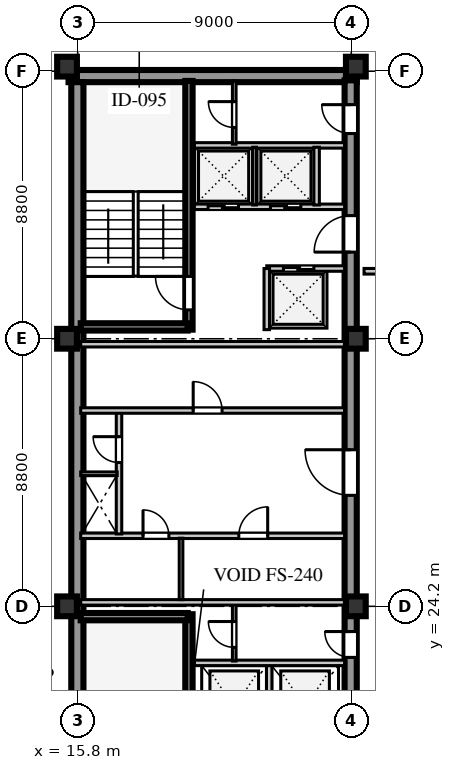
"""IFC4 building model, lengths in metres.
Left out: names, types, materials, properties, quantities, classifications, styles, units other than length and angle.
Written with IfcOpenShell. Run it as: python <this file> out.ifc"""

import sys

from ifc_helpers import new_model, si_unit, direction, frame, frame_2d, origin, origin_2d, place, context, subcontext, project, spatial, rectangle, extrude, element, fill, save


model = new_model("IFC4")
c1 = context("Model", 3, precision=1e-05, world=origin(), true_north=direction((0.0, 1.0)))
c2 = subcontext(c1, "Body", "Model", "MODEL_VIEW")
j1 = project(units=[si_unit("LENGTHUNIT", "METRE"), si_unit("PLANEANGLEUNIT", "RADIAN")], contexts=[c1])
p1 = place(None, origin())
s1 = spatial("IfcSite", under=j1, at=p1, CompositionType="ELEMENT")
p2 = place(p1, origin())
s2 = spatial("IfcBuilding", under=s1, at=p2, CompositionType="ELEMENT")
p3 = place(p2, frame((0.0, 0.0, 335.3)))
s3 = spatial("IfcBuildingStorey", under=s2, at=p3, CompositionType="ELEMENT", Elevation=335.3)
p4 = place(p3, frame((15.5, 41.64, 0.0), z_axis=(0.0, 0.0, 1.0), x_axis=(1.0, 0.0, 0.0)))
e1 = element("IfcWall", 1, at=p4, inside=s3, PredefinedType="SHEAR", context=c2, shape_type="SweptSolid", body=[
    extrude(rectangle(XDim=9.48, YDim=0.4, at=frame_2d((4.74, 0.0))), origin(), (0.0, 0.0, 1.0), 3.56),
])
p5 = place(p3, frame((15.79, 15.81, 0.0), z_axis=(0.0, 0.0, 1.0), x_axis=(0.0, 1.0, 0.0)))
e2 = element("IfcWall", 2, at=p5, inside=s3, PredefinedType="SHEAR", context=c2, shape_type="SweptSolid", body=[
    extrude(rectangle(XDim=25.63, YDim=0.4, at=frame_2d((12.815, 0.0))), origin(), (0.0, 0.0, 1.0), 3.56),
])
p6 = place(p3, frame((24.78, 15.74, 0.0), z_axis=(0.0, 0.0, 1.0), x_axis=(0.0, 1.0, 0.0)))
e3 = element("IfcWall", 3, at=p6, inside=s3, PredefinedType="SHEAR", context=c2, shape_type="SweptSolid", body=[
    extrude(rectangle(XDim=25.76, YDim=0.4, at=frame_2d((12.88, 0.0))), origin(), (0.0, 0.0, 1.0), 3.56),
])
p7 = place(p6, frame((1.61, 0.0, 0.0)))
e4 = element("IfcOpeningElement", 4, at=p7, cuts=e3, PredefinedType="OPENING", context=c2, shape_type="SweptSolid", body=[
    extrude(rectangle(XDim=1.2, YDim=2.1, at=frame_2d((0.6, 1.05))), frame((0.0, 0.21, 0.0), z_axis=(0.0, -1.0, 0.0), x_axis=(1.0, 0.0, 0.0)), (0.0, 0.0, 1.0), 0.42),
])
p8 = place(p6, frame((6.78, 0.0, 0.0)))
e5 = element("IfcOpeningElement", 5, at=p8, cuts=e3, PredefinedType="OPENING", context=c2, shape_type="SweptSolid", body=[
    extrude(rectangle(XDim=0.85, YDim=2.06, at=frame_2d((0.425, 1.03))), frame((0.0, 0.21, 0.0), z_axis=(0.0, -1.0, 0.0), x_axis=(1.0, 0.0, 0.0)), (0.0, 0.0, 1.0), 0.42),
])
p9 = place(p6, frame((12.11, 0.0, 0.0)))
e6 = element("IfcOpeningElement", 6, at=p9, cuts=e3, PredefinedType="OPENING", context=c2, shape_type="SweptSolid", body=[
    extrude(rectangle(XDim=1.5, YDim=2.12, at=frame_2d((0.75, 1.06))), frame((0.0, 0.21, 0.0), z_axis=(0.0, -1.0, 0.0), x_axis=(1.0, 0.0, 0.0)), (0.0, 0.0, 1.0), 0.42),
])
p10 = place(p6, frame((20.11, 0.0, 0.0)))
e7 = element("IfcOpeningElement", 7, at=p10, cuts=e3, PredefinedType="OPENING", context=c2, shape_type="SweptSolid", body=[
    extrude(rectangle(XDim=1.2, YDim=2.12, at=frame_2d((0.6, 1.06))), frame((0.0, 0.21, 0.0), z_axis=(0.0, -1.0, 0.0), x_axis=(1.0, 0.0, 0.0)), (0.0, 0.0, 1.0), 0.42),
])
p11 = place(p6, frame((24.01, 0.0, 0.0)))
e8 = element("IfcOpeningElement", 8, at=p11, cuts=e3, PredefinedType="OPENING", context=c2, shape_type="SweptSolid", body=[
    extrude(rectangle(XDim=0.95, YDim=2.1, at=frame_2d((0.475, 1.05))), frame((0.0, 0.21, 0.0), z_axis=(0.0, -1.0, 0.0), x_axis=(1.0, 0.0, 0.0)), (0.0, 0.0, 1.0), 0.42),
])
for number, where, z_axis, x_axis in (
    (9, (15.45, 24.2, 0.0), (0.0, 0.0, 1.0), (1.0, 0.0, 0.0)),
    (10, (15.45, 33.0, 0.0), (0.0, 0.0, 1.0), (1.0, 0.0, 0.0)),
    (11, (15.45, 41.95, 0.0), (0.0, 0.0, 1.0), (1.0, 0.0, 0.0)),
    (12, (24.95, 24.2, 0.0), (0.0, 0.0, 1.0), (1.0, 0.0, 0.0)),
    (13, (24.95, 33.0, 0.0), (0.0, 0.0, 1.0), (1.0, 0.0, 0.0)),
    (14, (24.95, 41.95, 0.0), (0.0, 0.0, 1.0), (1.0, 0.0, 0.0)),
):
    element("IfcColumn", number, at=place(p3, frame(where, z_axis=z_axis, x_axis=x_axis)), inside=s3, PredefinedType="COLUMN", context=c2, shape_type="SweptSolid", body=[
        extrude(rectangle(XDim=0.65, YDim=0.65, at=origin_2d()), origin(), (0.0, 0.0, 1.0), 3.56),
    ])
p12 = place(p3, frame((19.46, 15.74, 0.0), z_axis=(0.0, 0.0, 1.0), x_axis=(0.0, 1.0, 0.0)))
e15 = element("IfcWall", 15, at=p12, inside=s3, PredefinedType="SHEAR", context=c2, shape_type="SweptSolid", body=[
    extrude(rectangle(XDim=8.2, YDim=0.24, at=frame_2d((4.1, 0.0))), origin(), (0.0, 0.0, 1.0), 3.8),
])
p13 = place(p12, frame((0.45, 0.0, 0.0)))
e16 = element("IfcOpeningElement", 16, at=p13, cuts=e15, PredefinedType="OPENING", context=c2, shape_type="SweptSolid", body=[
    extrude(rectangle(XDim=1.1, YDim=2.1, at=frame_2d((0.55, 1.05))), frame((0.0, 0.13, 0.0), z_axis=(0.0, -1.0, 0.0), x_axis=(1.0, 0.0, 0.0)), (0.0, 0.0, 1.0), 0.26),
])
p14 = place(p3, frame((15.9, 23.86, 0.0), z_axis=(0.0, 0.0, 1.0), x_axis=(1.0, 0.0, 0.0)))
e17 = element("IfcWall", 17, at=p14, inside=s3, PredefinedType="SHEAR", context=c2, shape_type="SweptSolid", body=[
    extrude(rectangle(XDim=3.52, YDim=0.24, at=frame_2d((1.76, 0.0))), origin(), (0.0, 0.0, 1.0), 3.8),
])
p15 = place(p3, frame((22.1, 19.51, 0.0), z_axis=(0.0, 0.0, 1.0), x_axis=(0.0, 1.0, 0.0)))
e18 = element("IfcWall", 18, at=p15, inside=s3, PredefinedType="SOLIDWALL", context=c2, shape_type="SweptSolid", body=[
    extrude(rectangle(XDim=2.74, YDim=0.18, at=frame_2d((1.37, 0.0))), origin(), (0.0, 0.0, 1.0), 3.56),
])
p16 = place(p3, frame((19.64, 22.34, 0.0), z_axis=(0.0, 0.0, 1.0), x_axis=(1.0, 0.0, 0.0)))
e19 = element("IfcWall", 19, at=p16, inside=s3, PredefinedType="SOLIDWALL", context=c2, shape_type="SweptSolid", body=[
    extrude(rectangle(XDim=4.94, YDim=0.18, at=frame_2d((2.47, 0.0))), origin(), (0.0, 0.0, 1.0), 3.56),
])
p17 = place(p3, frame((20.95, 22.4, 0.0), z_axis=(0.0, 0.0, 1.0), x_axis=(0.0, 1.0, 0.0)))
e20 = element("IfcWall", 20, at=p17, inside=s3, PredefinedType="PARTITIONING", context=c2, shape_type="SweptSolid", body=[
    extrude(rectangle(XDim=1.88, YDim=0.12, at=frame_2d((0.94, 0.0))), origin(), (0.0, 0.0, 1.0), 3.56),
])
p18 = place(p17, frame((0.45, 0.0, 0.0)))
e21 = element("IfcOpeningElement", 21, at=p18, cuts=e20, PredefinedType="OPENING", context=c2, shape_type="SweptSolid", body=[
    extrude(rectangle(XDim=0.85, YDim=2.06, at=frame_2d((0.425, 1.03))), frame((0.0, 0.07, 0.0), z_axis=(0.0, -1.0, 0.0), x_axis=(1.0, 0.0, 0.0)), (0.0, 0.0, 1.0), 0.14),
])
p19 = place(p3, frame((15.9, 26.52, 0.0), z_axis=(0.0, 0.0, 1.0), x_axis=(1.0, 0.0, 0.0)))
e22 = element("IfcWall", 22, at=p19, inside=s3, PredefinedType="SOLIDWALL", context=c2, shape_type="SweptSolid", body=[
    extrude(rectangle(XDim=8.68, YDim=0.18, at=frame_2d((4.34, 0.0))), origin(), (0.0, 0.0, 1.0), 3.56),
])
p20 = place(p19, frame((2.05, 0.0, 0.0)))
e23 = element("IfcOpeningElement", 23, at=p20, cuts=e22, PredefinedType="OPENING", context=c2, shape_type="SweptSolid", body=[
    extrude(rectangle(XDim=0.85, YDim=2.06, at=frame_2d((0.425, 1.03))), frame((0.0, 0.1, 0.0), z_axis=(0.0, -1.0, 0.0), x_axis=(1.0, 0.0, 0.0)), (0.0, 0.0, 1.0), 0.2),
])
p21 = place(p19, frame((5.2, 0.0, 0.0)))
e24 = element("IfcOpeningElement", 24, at=p21, cuts=e22, PredefinedType="OPENING", context=c2, shape_type="SweptSolid", body=[
    extrude(rectangle(XDim=0.95, YDim=2.1, at=frame_2d((0.475, 1.05))), frame((0.0, 0.1, 0.0), z_axis=(0.0, -1.0, 0.0), x_axis=(1.0, 0.0, 0.0)), (0.0, 0.0, 1.0), 0.2),
])
p22 = place(p3, frame((15.9, 24.33, 0.0), z_axis=(0.0, 0.0, 1.0), x_axis=(1.0, 0.0, 0.0)))
e25 = element("IfcWall", 25, at=p22, inside=s3, PredefinedType="SOLIDWALL", context=c2, shape_type="SweptSolid", body=[
    extrude(rectangle(XDim=8.68, YDim=0.18, at=frame_2d((4.34, 0.0))), origin(), (0.0, 0.0, 1.0), 2.96),
])
p23 = place(p3, frame((19.2, 24.42, 0.0), z_axis=(0.0, 0.0, 1.0), x_axis=(0.0, 1.0, 0.0)))
e26 = element("IfcWall", 26, at=p23, inside=s3, PredefinedType="PARTITIONING", context=c2, shape_type="SweptSolid", body=[
    extrude(rectangle(XDim=2.02, YDim=0.12, at=frame_2d((1.01, 0.0))), origin(), (0.0, 0.0, 1.0), 3.56),
])
p24 = place(p3, frame((17.16, 26.58, 0.0), z_axis=(0.0, 0.0, 1.0), x_axis=(0.0, 1.0, 0.0)))
e27 = element("IfcWall", 27, at=p24, inside=s3, PredefinedType="SOLIDWALL", context=c2, shape_type="SweptSolid", body=[
    extrude(rectangle(XDim=4.02, YDim=0.18, at=frame_2d((2.01, 0.0))), origin(), (0.0, 0.0, 1.0), 3.56),
])
p25 = place(p24, frame((2.35, 0.0, 0.0)))
e28 = element("IfcOpeningElement", 28, at=p25, cuts=e27, PredefinedType="OPENING", context=c2, shape_type="SweptSolid", body=[
    extrude(rectangle(XDim=0.85, YDim=2.06, at=frame_2d((0.425, 1.03))), frame((0.0, 0.1, 0.0), z_axis=(0.0, -1.0, 0.0), x_axis=(1.0, 0.0, 0.0)), (0.0, 0.0, 1.0), 0.2),
])
p26 = place(p3, frame((15.9, 28.56, 0.0), z_axis=(0.0, 0.0, 1.0), x_axis=(1.0, 0.0, 0.0)))
e29 = element("IfcWall", 29, at=p26, inside=s3, PredefinedType="PARTITIONING", context=c2, shape_type="SweptSolid", body=[
    extrude(rectangle(XDim=1.2, YDim=0.12, at=frame_2d((0.6, 0.0))), origin(), (0.0, 0.0, 1.0), 3.56),
])
p27 = place(p3, frame((15.9, 30.64, 0.0), z_axis=(0.0, 0.0, 1.0), x_axis=(1.0, 0.0, 0.0)))
e30 = element("IfcWall", 30, at=p27, inside=s3, PredefinedType="SOLIDWALL", context=c2, shape_type="SweptSolid", body=[
    extrude(rectangle(XDim=8.68, YDim=0.18, at=frame_2d((4.34, 0.0))), origin(), (0.0, 0.0, 1.0), 3.56),
])
p28 = place(p27, frame((3.7, 0.0, 0.0)))
e31 = element("IfcOpeningElement", 31, at=p28, cuts=e30, PredefinedType="OPENING", context=c2, shape_type="SweptSolid", body=[
    extrude(rectangle(XDim=0.95, YDim=2.1, at=frame_2d((0.475, 1.05))), frame((0.0, 0.1, 0.0), z_axis=(0.0, -1.0, 0.0), x_axis=(1.0, 0.0, 0.0)), (0.0, 0.0, 1.0), 0.2),
])
p29 = place(p3, frame((15.9, 32.82, 0.0), z_axis=(0.0, 0.0, 1.0), x_axis=(1.0, 0.0, 0.0)))
e32 = element("IfcWall", 32, at=p29, inside=s3, PredefinedType="SOLIDWALL", context=c2, shape_type="SweptSolid", body=[
    extrude(rectangle(XDim=8.68, YDim=0.18, at=frame_2d((4.34, 0.0))), origin(), (0.0, 0.0, 1.0), 2.96),
])
p30 = place(p3, frame((19.46, 33.3, 0.0), z_axis=(0.0, 0.0, 1.0), x_axis=(0.0, 1.0, 0.0)))
e33 = element("IfcWall", 33, at=p30, inside=s3, PredefinedType="SHEAR", context=c2, shape_type="SweptSolid", body=[
    extrude(rectangle(XDim=8.18, YDim=0.24, at=frame_2d((4.09, 0.0))), origin(), (0.0, 0.0, 1.0), 3.8),
])
p31 = place(p30, frame((0.65, 0.0, 0.0)))
e34 = element("IfcOpeningElement", 34, at=p31, cuts=e33, PredefinedType="OPENING", context=c2, shape_type="SweptSolid", body=[
    extrude(rectangle(XDim=1.1, YDim=2.1, at=frame_2d((0.55, 1.05))), frame((0.0, 0.13, 0.0), z_axis=(0.0, -1.0, 0.0), x_axis=(1.0, 0.0, 0.0)), (0.0, 0.0, 1.0), 0.26),
])
p32 = place(p3, frame((15.9, 33.39, 0.0), z_axis=(0.0, 0.0, 1.0), x_axis=(1.0, 0.0, 0.0)))
e35 = element("IfcWall", 35, at=p32, inside=s3, PredefinedType="SHEAR", context=c2, shape_type="SweptSolid", body=[
    extrude(rectangle(XDim=3.52, YDim=0.24, at=frame_2d((1.76, 0.0))), origin(), (0.0, 0.0, 1.0), 3.8),
])
p33 = place(p3, frame((22.02, 35.31, 0.0), z_axis=(0.0, 0.0, 1.0), x_axis=(1.0, 0.0, 0.0)))
e36 = element("IfcWall", 36, at=p33, inside=s3, PredefinedType="SOLIDWALL", context=c2, shape_type="SweptSolid", body=[
    extrude(rectangle(XDim=2.56, YDim=0.18, at=frame_2d((1.28, 0.0))), origin(), (0.0, 0.0, 1.0), 3.56),
])
p34 = place(p33, frame((0.55, 0.0, 0.0)))
e37 = element("IfcOpeningElement", 37, at=p34, cuts=e36, PredefinedType="OPENING", context=c2, shape_type="SweptSolid", body=[
    extrude(rectangle(XDim=1.0, YDim=2.1, at=frame_2d((0.5, 1.05))), frame((0.0, 0.1, 0.0), z_axis=(0.0, -1.0, 0.0), x_axis=(1.0, 0.0, 0.0)), (0.0, 0.0, 1.0), 0.2),
])
p35 = place(p3, frame((22.02, 33.3, 0.0), z_axis=(0.0, 0.0, 1.0), x_axis=(0.0, 1.0, 0.0)))
e38 = element("IfcWall", 38, at=p35, inside=s3, PredefinedType="SOLIDWALL", context=c2, shape_type="SweptSolid", body=[
    extrude(rectangle(XDim=2.01, YDim=0.18, at=frame_2d((1.005, 0.0))), origin(), (0.0, 0.0, 1.0), 3.56),
])
p36 = place(p3, frame((19.64, 37.34, 0.0), z_axis=(0.0, 0.0, 1.0), x_axis=(1.0, 0.0, 0.0)))
e39 = element("IfcWall", 39, at=p36, inside=s3, PredefinedType="SOLIDWALL", context=c2, shape_type="SweptSolid", body=[
    extrude(rectangle(XDim=4.94, YDim=0.18, at=frame_2d((2.47, 0.0))), origin(), (0.0, 0.0, 1.0), 3.56),
])
p37 = place(p36, frame((0.45, 0.0, 0.0)))
e40 = element("IfcOpeningElement", 40, at=p37, cuts=e39, PredefinedType="OPENING", context=c2, shape_type="SweptSolid", body=[
    extrude(rectangle(XDim=1.0, YDim=2.1, at=frame_2d((0.5, 1.05))), frame((0.0, 0.1, 0.0), z_axis=(0.0, -1.0, 0.0), x_axis=(1.0, 0.0, 0.0)), (0.0, 0.0, 1.0), 0.2),
])
p38 = place(p36, frame((2.5, 0.0, 0.0)))
e41 = element("IfcOpeningElement", 41, at=p38, cuts=e39, PredefinedType="OPENING", context=c2, shape_type="SweptSolid", body=[
    extrude(rectangle(XDim=1.0, YDim=2.1, at=frame_2d((0.5, 1.05))), frame((0.0, 0.1, 0.0), z_axis=(0.0, -1.0, 0.0), x_axis=(1.0, 0.0, 0.0)), (0.0, 0.0, 1.0), 0.2),
])
p39 = place(p3, frame((19.64, 39.36, 0.0), z_axis=(0.0, 0.0, 1.0), x_axis=(1.0, 0.0, 0.0)))
e42 = element("IfcWall", 42, at=p39, inside=s3, PredefinedType="SOLIDWALL", context=c2, shape_type="SweptSolid", body=[
    extrude(rectangle(XDim=4.94, YDim=0.18, at=frame_2d((2.47, 0.0))), origin(), (0.0, 0.0, 1.0), 3.56),
])
p40 = place(p3, frame((21.62, 37.4, 0.0), z_axis=(0.0, 0.0, 1.0), x_axis=(0.0, 1.0, 0.0)))
e43 = element("IfcWall", 43, at=p40, inside=s3, PredefinedType="PARTITIONING", context=c2, shape_type="SweptSolid", body=[
    extrude(rectangle(XDim=1.9, YDim=0.12, at=frame_2d((0.95, 0.0))), origin(), (0.0, 0.0, 1.0), 3.56),
])
p41 = place(p3, frame((23.66, 37.4, 0.0), z_axis=(0.0, 0.0, 1.0), x_axis=(0.0, 1.0, 0.0)))
e44 = element("IfcWall", 44, at=p41, inside=s3, PredefinedType="SOLIDWALL", context=c2, shape_type="SweptSolid", body=[
    extrude(rectangle(XDim=1.9, YDim=0.18, at=frame_2d((0.95, 0.0))), origin(), (0.0, 0.0, 1.0), 3.56),
])
p42 = place(p3, frame((20.95, 39.4, 0.0), z_axis=(0.0, 0.0, 1.0), x_axis=(0.0, 1.0, 0.0)))
e45 = element("IfcWall", 45, at=p42, inside=s3, PredefinedType="PARTITIONING", context=c2, shape_type="SweptSolid", body=[
    extrude(rectangle(XDim=2.08, YDim=0.12, at=frame_2d((1.04, 0.0))), origin(), (0.0, 0.0, 1.0), 3.56),
])
p43 = place(p42, frame((0.55, 0.0, 0.0)))
e46 = element("IfcOpeningElement", 46, at=p43, cuts=e45, PredefinedType="OPENING", context=c2, shape_type="SweptSolid", body=[
    extrude(rectangle(XDim=0.85, YDim=2.06, at=frame_2d((0.425, 1.03))), frame((0.0, 0.07, 0.0), z_axis=(0.0, -1.0, 0.0), x_axis=(1.0, 0.0, 0.0)), (0.0, 0.0, 1.0), 0.14),
])
p44 = place(p3, frame((25.22, 35.22, 0.0), z_axis=(0.0, 0.0, 1.0), x_axis=(1.0, 0.0, 0.0)))
e47 = element("IfcWall", 47, at=p44, inside=s3, PredefinedType="SOLIDWALL", context=c2, shape_type="SweptSolid", body=[
    extrude(rectangle(XDim=9.5, YDim=0.185, at=frame_2d((4.75, 0.0))), origin(), (0.0, 0.0, 1.0), 3.56),
])
p45 = place(p44, frame((3.2, 0.0, 0.0)))
e48 = element("IfcOpeningElement", 48, at=p45, cuts=e47, PredefinedType="OPENING", context=c2, shape_type="SweptSolid", body=[
    extrude(rectangle(XDim=1.0, YDim=2.08, at=frame_2d((0.5, 1.04))), frame((0.0, 0.103, 0.0), z_axis=(0.0, -1.0, 0.0), x_axis=(1.0, 0.0, 0.0)), (0.0, 0.0, 1.0), 0.205),
])
p46 = place(p44, frame((6.2, 0.0, 0.0)))
e49 = element("IfcOpeningElement", 49, at=p46, cuts=e47, PredefinedType="OPENING", context=c2, shape_type="SweptSolid", body=[
    extrude(rectangle(XDim=0.9, YDim=2.08, at=frame_2d((0.45, 1.04))), frame((0.0, 0.103, 0.0), z_axis=(0.0, -1.0, 0.0), x_axis=(1.0, 0.0, 0.0)), (0.0, 0.0, 1.0), 0.205),
])
p47 = place(p18, origin())
e50 = element("IfcDoor", 50, at=p47, inside=s3, OperationType="SINGLE_SWING_RIGHT", PredefinedType="DOOR", context=c2, shape_type="SweptSolid", body=[
    extrude(rectangle(XDim=0.85, YDim=2.06, at=frame_2d((0.425, 1.03))), frame((0.0, 0.025, 0.0), z_axis=(0.0, -1.0, 0.0), x_axis=(1.0, 0.0, 0.0)), (0.0, 0.0, 1.0), 0.05),
])
fill(e21, e50)
p48 = place(p8, frame((0.85, 0.0, 0.0), z_axis=(0.0, 0.0, 1.0), x_axis=(-1.0, 0.0, 0.0)))
e51 = element("IfcDoor", 51, at=p48, inside=s3, OperationType="SINGLE_SWING_LEFT", PredefinedType="DOOR", context=c2, shape_type="SweptSolid", body=[
    extrude(rectangle(XDim=0.85, YDim=2.06, at=frame_2d((0.425, 1.03))), frame((0.0, 0.025, 0.0), z_axis=(0.0, -1.0, 0.0), x_axis=(1.0, 0.0, 0.0)), (0.0, 0.0, 1.0), 0.05),
])
fill(e5, e51)
p49 = place(p20, origin())
e52 = element("IfcDoor", 52, at=p49, inside=s3, OperationType="SINGLE_SWING_LEFT", PredefinedType="DOOR", context=c2, shape_type="SweptSolid", body=[
    extrude(rectangle(XDim=0.85, YDim=2.06, at=frame_2d((0.425, 1.03))), frame((0.0, 0.025, 0.0), z_axis=(0.0, -1.0, 0.0), x_axis=(1.0, 0.0, 0.0)), (0.0, 0.0, 1.0), 0.05),
])
fill(e23, e52)
p50 = place(p21, origin())
e53 = element("IfcDoor", 53, at=p50, inside=s3, OperationType="SINGLE_SWING_RIGHT", PredefinedType="DOOR", context=c2, shape_type="SweptSolid", body=[
    extrude(rectangle(XDim=0.95, YDim=2.1, at=frame_2d((0.475, 1.05))), frame((0.0, 0.025, 0.0), z_axis=(0.0, -1.0, 0.0), x_axis=(1.0, 0.0, 0.0)), (0.0, 0.0, 1.0), 0.05),
])
fill(e24, e53)
p51 = place(p25, origin())
e54 = element("IfcDoor", 54, at=p51, inside=s3, OperationType="SINGLE_SWING_RIGHT", PredefinedType="DOOR", context=c2, shape_type="SweptSolid", body=[
    extrude(rectangle(XDim=0.85, YDim=2.06, at=frame_2d((0.425, 1.03))), frame((0.0, 0.025, 0.0), z_axis=(0.0, -1.0, 0.0), x_axis=(1.0, 0.0, 0.0)), (0.0, 0.0, 1.0), 0.05),
])
fill(e28, e54)
p52 = place(p9, frame((1.5, 0.0, 0.0), z_axis=(0.0, 0.0, 1.0), x_axis=(-1.0, 0.0, 0.0)))
e55 = element("IfcDoor", 55, at=p52, inside=s3, OperationType="SINGLE_SWING_LEFT", PredefinedType="DOOR", context=c2, shape_type="SweptSolid", body=[
    extrude(rectangle(XDim=1.5, YDim=2.12, at=frame_2d((0.75, 1.06))), frame((0.0, 0.025, 0.0), z_axis=(0.0, -1.0, 0.0), x_axis=(1.0, 0.0, 0.0)), (0.0, 0.0, 1.0), 0.05),
])
fill(e6, e55)
p53 = place(p28, frame((0.95, 0.0, 0.0), z_axis=(0.0, 0.0, 1.0), x_axis=(-1.0, 0.0, 0.0)))
e56 = element("IfcDoor", 56, at=p53, inside=s3, OperationType="SINGLE_SWING_RIGHT", PredefinedType="DOOR", context=c2, shape_type="SweptSolid", body=[
    extrude(rectangle(XDim=0.95, YDim=2.1, at=frame_2d((0.475, 1.05))), frame((0.0, 0.025, 0.0), z_axis=(0.0, -1.0, 0.0), x_axis=(1.0, 0.0, 0.0)), (0.0, 0.0, 1.0), 0.05),
])
fill(e31, e56)
p54 = place(p31, origin())
e57 = element("IfcDoor", 57, at=p54, inside=s3, OperationType="SINGLE_SWING_RIGHT", PredefinedType="DOOR", context=c2, shape_type="SweptSolid", body=[
    extrude(rectangle(XDim=1.1, YDim=2.1, at=frame_2d((0.55, 1.05))), frame((0.0, 0.025, 0.0), z_axis=(0.0, -1.0, 0.0), x_axis=(1.0, 0.0, 0.0)), (0.0, 0.0, 1.0), 0.05),
])
fill(e34, e57)
p55 = place(p10, frame((1.2, 0.0, 0.0), z_axis=(0.0, 0.0, 1.0), x_axis=(-1.0, 0.0, 0.0)))
e58 = element("IfcDoor", 58, at=p55, inside=s3, OperationType="SINGLE_SWING_RIGHT", PredefinedType="DOOR", context=c2, shape_type="SweptSolid", body=[
    extrude(rectangle(XDim=1.2, YDim=2.12, at=frame_2d((0.6, 1.06))), frame((0.0, 0.025, 0.0), z_axis=(0.0, -1.0, 0.0), x_axis=(1.0, 0.0, 0.0)), (0.0, 0.0, 1.0), 0.05),
])
fill(e7, e58)
p56 = place(p37, frame((1.0, 0.0, 0.0), z_axis=(0.0, 0.0, 1.0), x_axis=(-1.0, 0.0, 0.0)))
e59 = element("IfcDoor", 59, at=p56, inside=s3, OperationType="DOUBLE_DOOR_SLIDING", PredefinedType="DOOR", context=c2, shape_type="SweptSolid", body=[
    extrude(rectangle(XDim=1.0, YDim=2.1, at=frame_2d((0.5, 1.05))), frame((0.0, 0.025, 0.0), z_axis=(0.0, -1.0, 0.0), x_axis=(1.0, 0.0, 0.0)), (0.0, 0.0, 1.0), 0.05),
])
fill(e40, e59)
p57 = place(p38, frame((1.0, 0.0, 0.0), z_axis=(0.0, 0.0, 1.0), x_axis=(-1.0, 0.0, 0.0)))
e60 = element("IfcDoor", 60, at=p57, inside=s3, OperationType="DOUBLE_DOOR_SLIDING", PredefinedType="DOOR", context=c2, shape_type="SweptSolid", body=[
    extrude(rectangle(XDim=1.0, YDim=2.1, at=frame_2d((0.5, 1.05))), frame((0.0, 0.025, 0.0), z_axis=(0.0, -1.0, 0.0), x_axis=(1.0, 0.0, 0.0)), (0.0, 0.0, 1.0), 0.05),
])
fill(e41, e60)
p58 = place(p34, origin())
e61 = element("IfcDoor", 61, at=p58, inside=s3, OperationType="DOUBLE_DOOR_SLIDING", PredefinedType="DOOR", context=c2, shape_type="SweptSolid", body=[
    extrude(rectangle(XDim=1.0, YDim=2.1, at=frame_2d((0.5, 1.05))), frame((0.0, 0.025, 0.0), z_axis=(0.0, -1.0, 0.0), x_axis=(1.0, 0.0, 0.0)), (0.0, 0.0, 1.0), 0.05),
])
fill(e37, e61)
p59 = place(p43, origin())
e62 = element("IfcDoor", 62, at=p59, inside=s3, OperationType="SINGLE_SWING_RIGHT", PredefinedType="DOOR", context=c2, shape_type="SweptSolid", body=[
    extrude(rectangle(XDim=0.85, YDim=2.06, at=frame_2d((0.425, 1.03))), frame((0.0, 0.025, 0.0), z_axis=(0.0, -1.0, 0.0), x_axis=(1.0, 0.0, 0.0)), (0.0, 0.0, 1.0), 0.05),
])
fill(e46, e62)
p60 = place(p11, frame((0.95, 0.0, 0.0), z_axis=(0.0, 0.0, 1.0), x_axis=(-1.0, 0.0, 0.0)))
e63 = element("IfcDoor", 63, at=p60, inside=s3, OperationType="SINGLE_SWING_LEFT", PredefinedType="DOOR", context=c2, shape_type="SweptSolid", body=[
    extrude(rectangle(XDim=0.95, YDim=2.1, at=frame_2d((0.475, 1.05))), frame((0.0, 0.025, 0.0), z_axis=(0.0, -1.0, 0.0), x_axis=(1.0, 0.0, 0.0)), (0.0, 0.0, 1.0), 0.05),
])
fill(e8, e63)
save(model, sys.argv[1])
